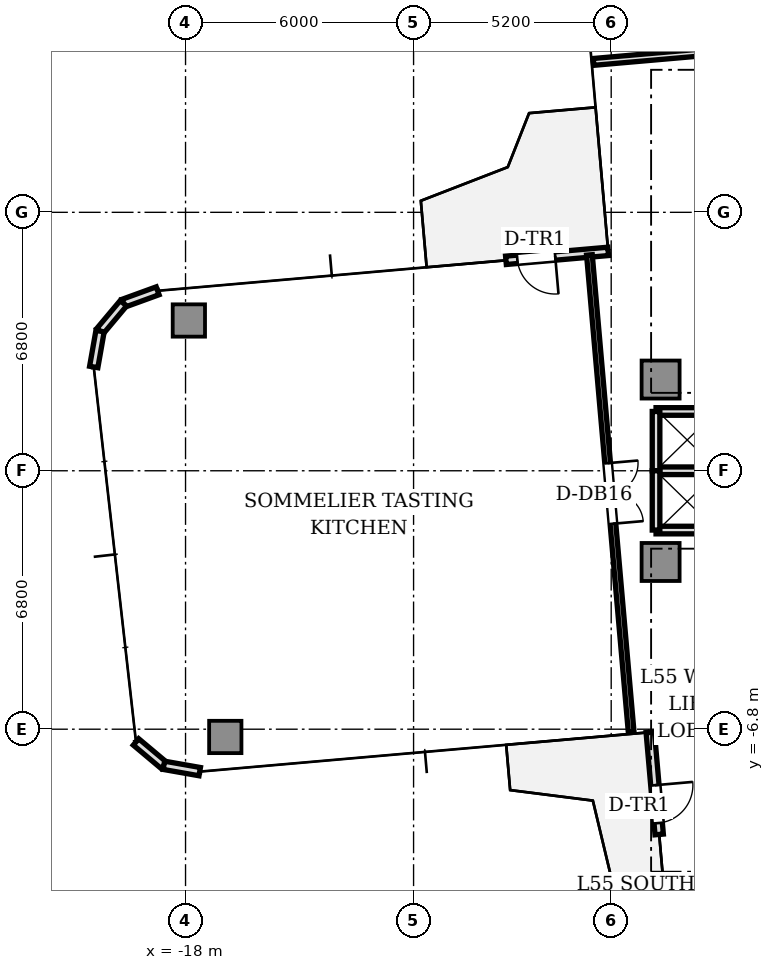
"""IFC4 building model, lengths in metres.
Left out: names, types, materials, properties, quantities, classifications, styles, units other than length and angle.
Written with IfcOpenShell. Run it as: python <this file> out.ifc"""

import sys

from ifc_helpers import new_model, si_unit, direction, frame, frame_2d, origin, origin_2d, place, context, subcontext, project, spatial, rectangle, extrude, source, transform, mapped, element, fill, save


model = new_model("IFC4")
c1 = context("Model", 3, precision=1e-05, world=origin(), true_north=direction((0.0, 1.0)))
c2 = subcontext(c1, "Body", "Model", "MODEL_VIEW")
j1 = project(units=[si_unit("LENGTHUNIT", "METRE"), si_unit("PLANEANGLEUNIT", "RADIAN")], contexts=[c1])
p1 = place(None, origin())
s1 = spatial("IfcSite", under=j1, at=p1, CompositionType="ELEMENT")
p2 = place(p1, origin())
s2 = spatial("IfcBuilding", under=s1, at=p2, CompositionType="ELEMENT")
p3 = place(p2, frame((0.0, 0.0, 198.65)))
s3 = spatial("IfcBuildingStorey", under=s2, at=p3, CompositionType="ELEMENT", Elevation=198.65)
m1 = source(origin(), c2, "Body", "SweptSolid", [
    extrude(rectangle(XDim=1.0, YDim=1.0, at=origin_2d()), origin(), (0.0, 0.0, 1.0), 3.03),
])
for number, where, z_axis, x_axis in (
    (1, (-5.5, 2.4, 0.0), (0.0, 0.0, 1.0), (1.0, 0.0, 0.0)),
    (2, (-5.5, -2.4, 0.0), (0.0, 0.0, 1.0), (1.0, 0.0, 0.0)),
):
    element("IfcColumn", number, at=place(p3, frame(where, z_axis=z_axis, x_axis=x_axis)), inside=s3, PredefinedType="COLUMN", context=c2, shape_type="MappedRepresentation", body=[
        mapped(m1, transform((0.0, 0.0, 0.0), scale=1.0)),
    ])
m2 = source(origin(), c2, "Body", "SweptSolid", [
    extrude(rectangle(XDim=0.85, YDim=0.85, at=origin_2d()), origin(), (0.0, 0.0, 1.0), 3.03),
])
for number, where, z_axis, x_axis in (
    (3, (-17.913, 3.954, 0.0), (0.0, 0.0, 1.0), (1.0, 0.0, 0.0)),
    (4, (-16.954, -7.004, 0.0), (0.0, 0.0, 1.0), (1.0, 0.0, 0.0)),
):
    element("IfcColumn", number, at=place(p3, frame(where, z_axis=z_axis, x_axis=x_axis)), inside=s3, PredefinedType="COLUMN", context=c2, shape_type="MappedRepresentation", body=[
        mapped(m2, transform((0.0, 0.0, 0.0), scale=1.0)),
    ])
p4 = place(p3, frame((-6.879, 5.772, 0.0), z_axis=(0.0, 0.0, 1.0), x_axis=(-0.996193619346, -0.087168071984, 0.0)))
e5 = element("IfcWall", 5, at=p4, inside=s3, PredefinedType="STANDARD", context=c2, shape_type="SweptSolid", body=[
    extrude(rectangle(XDim=2.7, YDim=0.22, at=frame_2d((1.35, 0.0))), origin(), (0.0, 0.0, 1.0), 3.03),
])
p5 = place(p4, frame((1.4, 0.0, 0.0)))
e6 = element("IfcOpeningElement", 6, at=p5, cuts=e5, PredefinedType="OPENING", context=c2, shape_type="SweptSolid", body=[
    extrude(rectangle(XDim=1.0, YDim=2.2, at=frame_2d((0.5, 1.1))), frame((0.0, 0.12, 0.0), z_axis=(0.0, -1.0, 0.0), x_axis=(1.0, 0.0, 0.0)), (0.0, 0.0, 1.0), 0.24),
])
p6 = place(p3, frame((-18.734, 4.735, 0.0), z_axis=(0.0, 0.0, 1.0), x_axis=(-0.939741306239, -0.34188635151, 0.0)))
e7 = element("IfcWall", 7, at=p6, inside=s3, PredefinedType="STANDARD", context=c2, shape_type="SweptSolid", body=[
    extrude(rectangle(XDim=0.958, YDim=0.22, at=frame_2d((0.479, 0.0))), origin(), (0.0, 0.0, 1.0), 3.03),
])
for number, where, z_axis, x_axis in (
    (8, (-19.634, 4.408, 0.0), (0.0, 0.0, 1.0), (-0.643, -0.766, 0.0)),
    (9, (-20.25, 3.674, 0.0), (0.0, 0.0, 1.0), (-0.174, -0.985, 0.0)),
):
    element("IfcWall", number, at=place(p3, frame(where, z_axis=z_axis, x_axis=x_axis)), inside=s3, PredefinedType="STANDARD", context=c2, shape_type="SweptSolid", body=[
        extrude(rectangle(XDim=0.958, YDim=0.22, at=frame_2d((0.479, 0.0))), origin(), (0.0, 0.0, 1.0), 3.03),
    ])
p7 = place(p3, frame((-19.304, -7.135, 0.0), z_axis=(0.0, 0.0, 1.0), x_axis=(0.766001159887, -0.642839189107, 0.0)))
e10 = element("IfcWall", 10, at=p7, inside=s3, PredefinedType="STANDARD", context=c2, shape_type="SweptSolid", body=[
    extrude(rectangle(XDim=0.958, YDim=0.22, at=frame_2d((0.479, 0.0))), origin(), (0.0, 0.0, 1.0), 3.03),
])
p8 = place(p3, frame((-18.57, -7.75, 0.0), z_axis=(0.0, 0.0, 1.0), x_axis=(0.984770724397, -0.173858046606, 0.0)))
e11 = element("IfcWall", 11, at=p8, inside=s3, PredefinedType="STANDARD", context=c2, shape_type="SweptSolid", body=[
    extrude(rectangle(XDim=0.958, YDim=0.22, at=frame_2d((0.479, 0.0))), origin(), (0.0, 0.0, 1.0), 3.03),
])
p9 = place(p3, frame((-5.772, -6.879, 0.0), z_axis=(0.0, 0.0, 1.0), x_axis=(0.087168071984, -0.996193619346, 0.0)))
e12 = element("IfcWall", 12, at=p9, inside=s3, PredefinedType="STANDARD", context=c2, shape_type="SweptSolid", body=[
    extrude(rectangle(XDim=2.7, YDim=0.22, at=frame_2d((1.35, 0.0))), origin(), (0.0, 0.0, 1.0), 3.03),
])
p10 = place(p9, frame((1.4, 0.0, 0.0)))
e13 = element("IfcOpeningElement", 13, at=p10, cuts=e12, PredefinedType="OPENING", context=c2, shape_type="SweptSolid", body=[
    extrude(rectangle(XDim=1.0, YDim=2.2, at=frame_2d((0.5, 1.1))), frame((0.0, 0.12, 0.0), z_axis=(0.0, -1.0, 0.0), x_axis=(1.0, 0.0, 0.0)), (0.0, 0.0, 1.0), 0.24),
])
for number, where, z_axis, x_axis in (
    (14, (-5.62, 1.56, 0.0), (0.0, 0.0, 1.0), (1.0, 0.0, 0.0)),
    (15, (-5.62, -1.56, 0.0), (0.0, 0.0, 1.0), (1.0, 0.0, 0.0)),
    (16, (-5.62, 0.0, 0.0), (0.0, 0.0, 1.0), (1.0, 0.0, 0.0)),
):
    element("IfcWall", number, at=place(p3, frame(where, z_axis=z_axis, x_axis=x_axis)), inside=s3, PredefinedType="SOLIDWALL", context=c2, shape_type="SweptSolid", body=[
        extrude(rectangle(XDim=1.64, YDim=0.2, at=frame_2d((0.82, 0.0))), origin(), (0.0, 0.0, 1.0), 2.58),
    ])
for number, where, z_axis, x_axis in (
    (17, (-5.62, 0.0, 0.0), (0.0, 0.0, 1.0), (0.0, 1.0, 0.0)),
    (18, (-5.62, -1.56, 0.0), (0.0, 0.0, 1.0), (0.0, 1.0, 0.0)),
):
    element("IfcWall", number, at=place(p3, frame(where, z_axis=z_axis, x_axis=x_axis)), inside=s3, PredefinedType="SOLIDWALL", context=c2, shape_type="SweptSolid", body=[
        extrude(rectangle(XDim=1.56, YDim=0.2, at=frame_2d((0.78, 0.0))), origin(), (0.0, 0.0, 1.0), 2.58),
    ])
p11 = place(p3, frame((3.095, 11.664, 0.0), z_axis=(0.0, 0.0, 1.0), x_axis=(-0.996196061386, -0.087140158824, 0.0)))
e19 = element("IfcWall", 19, at=p11, inside=s3, PredefinedType="PARTITIONING", context=c2, shape_type="SweptSolid", body=[
    extrude(rectangle(XDim=10.4, YDim=0.18, at=frame_2d((5.2, 0.0))), origin(), (0.0, 0.0, 1.0), 2.58),
])
p12 = place(p3, frame((-7.373, 5.679, 0.0), z_axis=(0.0, 0.0, 1.0), x_axis=(0.087154691724, -0.996194790044, 0.0)))
e20 = element("IfcWall", 20, at=p12, inside=s3, PredefinedType="PARTITIONING", context=c2, shape_type="SweptSolid", body=[
    extrude(rectangle(XDim=12.6, YDim=0.15, at=frame_2d((6.3, 0.0))), origin(), (0.0, 0.0, 1.0), 2.58),
])
p13 = place(p12, frame((5.5, 0.0, 0.0)))
e21 = element("IfcOpeningElement", 21, at=p13, cuts=e20, PredefinedType="OPENING", context=c2, shape_type="SweptSolid", body=[
    extrude(rectangle(XDim=1.6, YDim=2.25, at=frame_2d((0.8, 1.125))), frame((0.0, 0.085, 0.0), z_axis=(0.0, -1.0, 0.0), x_axis=(1.0, 0.0, 0.0)), (0.0, 0.0, 1.0), 0.17),
])
m3 = source(origin(), c2, "Body", "SweptSolid", [
    extrude(rectangle(XDim=1.0, YDim=0.05, at=origin_2d()), origin(), (0.0, 0.0, 1.0), 2.2),
])
p14 = place(p5, frame((0.5, 0.0, 0.0)))
e22 = element("IfcDoor", 22, at=p14, inside=s3, OperationType="SINGLE_SWING_LEFT", PredefinedType="DOOR", context=c2, shape_type="MappedRepresentation", body=[
    mapped(m3, transform((0.0, 0.0, 0.0), scale=1.0)),
])
fill(e6, e22)
p15 = place(p10, frame((0.5, 0.0, 0.0)))
e23 = element("IfcDoor", 23, at=p15, inside=s3, OperationType="SINGLE_SWING_LEFT", PredefinedType="DOOR", context=c2, shape_type="MappedRepresentation", body=[
    mapped(m3, transform((0.0, 0.0, 0.0), scale=1.0)),
])
fill(e13, e23)
m4 = source(origin(), c2, "Body", "SweptSolid", [
    extrude(rectangle(XDim=1.6, YDim=0.05, at=origin_2d()), origin(), (0.0, 0.0, 1.0), 2.25),
])
p16 = place(p13, frame((0.8, 0.0, 0.0)))
e24 = element("IfcDoor", 24, at=p16, inside=s3, OperationType="DOUBLE_DOOR_SINGLE_SWING", PredefinedType="DOOR", context=c2, shape_type="MappedRepresentation", body=[
    mapped(m4, transform((0.0, 0.0, 0.0), scale=1.0)),
])
fill(e21, e24)
save(model, sys.argv[1])
